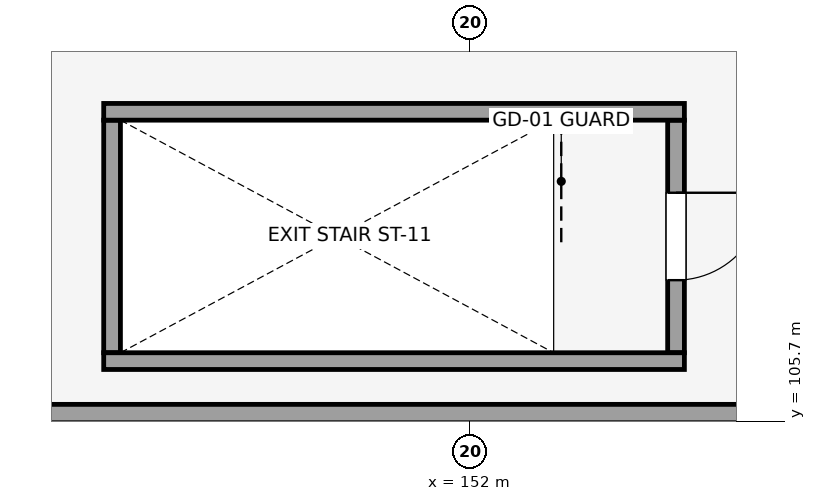
"""IFC4 building model, lengths in metres.
Left out: names, types, materials, properties, quantities, classifications, styles, units other than length and angle.
Written with IfcOpenShell. Run it as: python <this file> out.ifc"""

import sys

from ifc_helpers import new_model, si_unit, direction, frame, frame_2d, origin, place, context, subcontext, project, spatial, rectangle, extrude, element, fill, save


model = new_model("IFC4")
c1 = context("Model", 3, precision=1e-05, world=origin(), true_north=direction((0.0, 1.0)))
c2 = subcontext(c1, "Body", "Model", "MODEL_VIEW")
j1 = project(units=[si_unit("LENGTHUNIT", "METRE"), si_unit("PLANEANGLEUNIT", "RADIAN")], contexts=[c1])
p1 = place(None, origin())
s1 = spatial("IfcSite", under=j1, at=p1, CompositionType="ELEMENT")
p2 = place(p1, origin())
s2 = spatial("IfcBuilding", under=s1, at=p2, CompositionType="ELEMENT")
p3 = place(p2, frame((0.0, 0.0, 9.0)))
s3 = spatial("IfcBuildingStorey", under=s2, at=p3, CompositionType="ELEMENT", Elevation=9.0)
p4 = place(p3, frame((154.71, 109.66, 0.0), z_axis=(0.0, 0.0, 1.0), x_axis=(0.0, -1.0, 0.0)))
e1 = element("IfcWall", 1, at=p4, inside=s3, PredefinedType="SHEAR", context=c2, shape_type="SweptSolid", body=[
    extrude(rectangle(XDim=3.06, YDim=0.22, at=frame_2d((1.53, 0.0))), origin(), (0.0, 0.0, 1.0), 4.8),
])
p5 = place(p4, frame((0.955, 0.0, 0.0)))
e2 = element("IfcOpeningElement", 2, at=p5, cuts=e1, PredefinedType="OPENING", context=c2, shape_type="SweptSolid", body=[
    extrude(rectangle(XDim=1.15, YDim=2.15, at=frame_2d((0.575, 1.075))), frame((0.0, 0.12, 0.0), z_axis=(0.0, -1.0, 0.0), x_axis=(1.0, 0.0, 0.0)), (0.0, 0.0, 1.0), 0.24),
])
p6 = place(p3, frame((147.29, 109.66, 0.0), z_axis=(0.0, 0.0, 1.0), x_axis=(0.0, -1.0, 0.0)))
e3 = element("IfcWall", 3, at=p6, inside=s3, PredefinedType="SHEAR", context=c2, shape_type="SweptSolid", body=[
    extrude(rectangle(XDim=3.06, YDim=0.22, at=frame_2d((1.53, 0.0))), origin(), (0.0, 0.0, 1.0), 4.8),
])
for number, where, z_axis, x_axis in (
    (4, (154.82, 109.77, 0.0), (0.0, 0.0, 1.0), (-1.0, 0.0, 0.0)),
    (5, (154.82, 106.49, 0.0), (0.0, 0.0, 1.0), (-1.0, 0.0, 0.0)),
):
    element("IfcWall", number, at=place(p3, frame(where, z_axis=z_axis, x_axis=x_axis)), inside=s3, PredefinedType="SHEAR", context=c2, shape_type="SweptSolid", body=[
        extrude(rectangle(XDim=7.64, YDim=0.22, at=frame_2d((3.82, 0.0))), origin(), (0.0, 0.0, 1.0), 4.8),
    ])
p7 = place(p3, frame((144.176, 105.8, 0.0), z_axis=(0.0, 0.0, 1.0), x_axis=(1.0, 0.0, 0.0)))
e6 = element("IfcWall", 6, at=p7, inside=s3, PredefinedType="SOLIDWALL", context=c2, shape_type="SweptSolid", body=[
    extrude(rectangle(XDim=12.824, YDim=0.242, at=frame_2d((6.412, 0.0))), origin(), (0.0, 0.0, 1.0), 2.7),
])
p8 = place(p5, origin())
e7 = element("IfcDoor", 7, at=p8, inside=s3, OperationType="SINGLE_SWING_LEFT", PredefinedType="DOOR", context=c2, shape_type="SweptSolid", body=[
    extrude(rectangle(XDim=1.15, YDim=2.15, at=frame_2d((0.575, 1.075))), frame((0.0, 0.025, 0.0), z_axis=(0.0, -1.0, 0.0), x_axis=(1.0, 0.0, 0.0)), (0.0, 0.0, 1.0), 0.05),
])
fill(e2, e7)
save(model, sys.argv[1])
